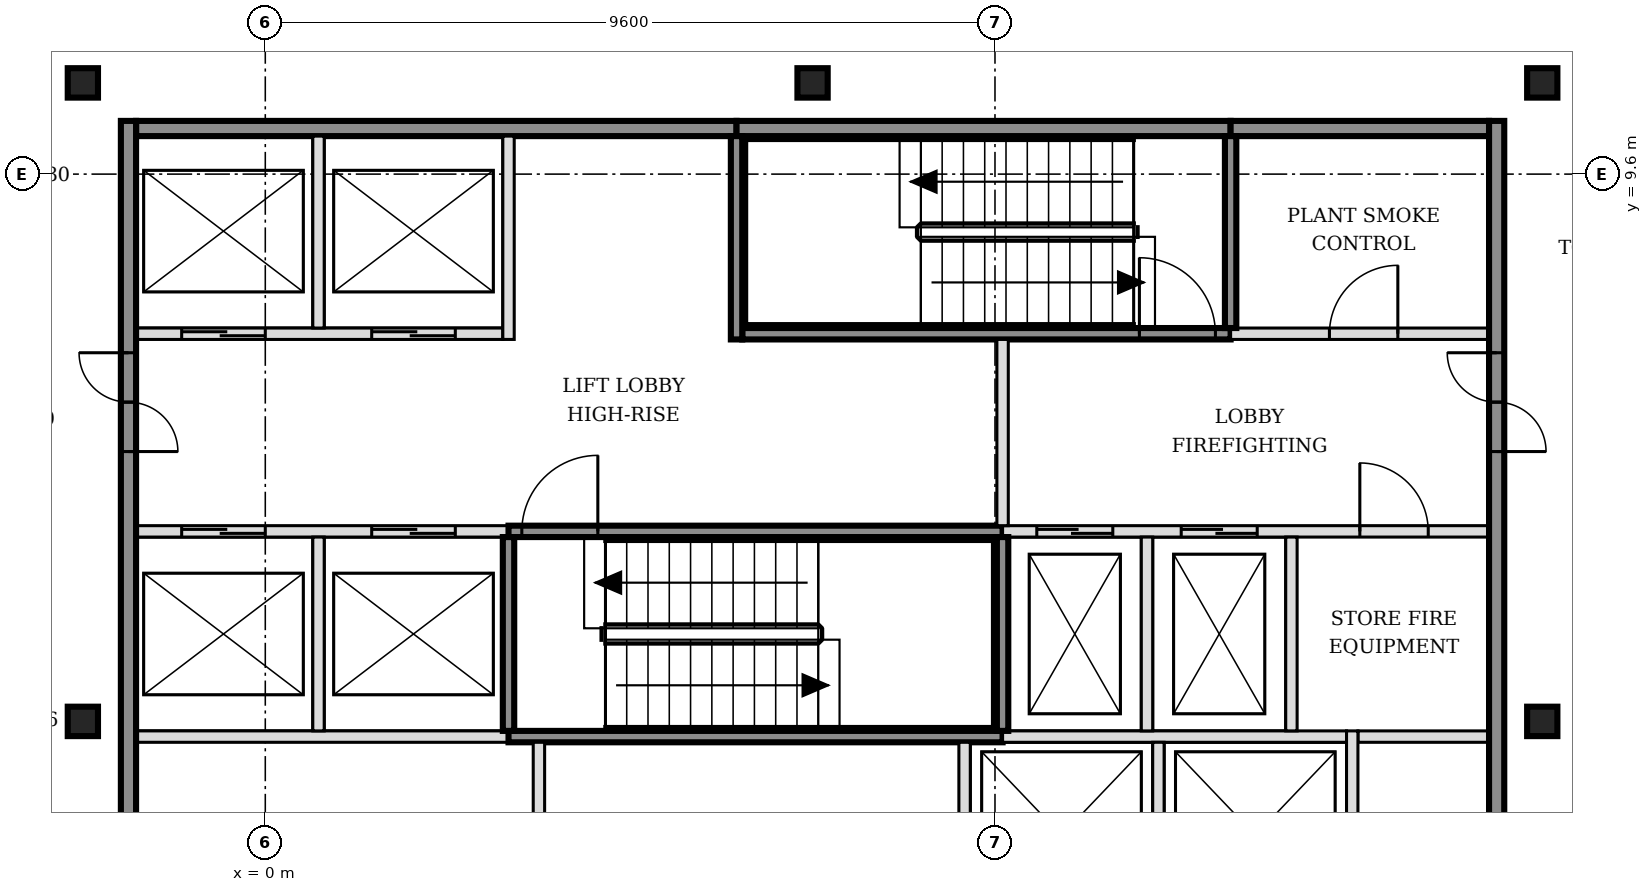
"""IFC4 building model, lengths in metres.
Left out: names, types, materials, properties, quantities, classifications, styles, units other than length and angle.
Written with IfcOpenShell. Run it as: python <this file> out.ifc"""

import sys

from ifc_helpers import new_model, si_unit, direction, frame, frame_2d, origin, origin_2d, place, context, subcontext, project, spatial, rectangle, i_section, extrude, element, fill, save


model = new_model("IFC4")
c1 = context("Model", 3, precision=1e-05, world=origin(), true_north=direction((0.0, 1.0)))
c2 = subcontext(c1, "Body", "Model", "MODEL_VIEW")
j1 = project(units=[si_unit("LENGTHUNIT", "METRE"), si_unit("PLANEANGLEUNIT", "RADIAN")], contexts=[c1])
p1 = place(None, origin())
s1 = spatial("IfcSite", under=j1, at=p1, CompositionType="ELEMENT")
p2 = place(p1, origin())
s2 = spatial("IfcBuilding", under=s1, at=p2, CompositionType="ELEMENT")
p3 = place(p2, frame((0.0, 0.0, 270.6)))
s3 = spatial("IfcBuildingStorey", under=s2, at=p3, CompositionType="ELEMENT", Elevation=270.6)
for number, where, z_axis, x_axis in (
    (1, (-2.4, 2.4, -0.15), (0.0, 0.0, 1.0), (1.0, 0.0, 0.0)),
    (2, (16.8, 2.4, -0.15), (0.0, 0.0, 1.0), (1.0, 0.0, 0.0)),
    (3, (-2.4, 10.8, -0.15), (0.0, 0.0, 1.0), (1.0, 0.0, 0.0)),
    (4, (7.2, 10.8, -0.15), (0.0, 0.0, 1.0), (1.0, 0.0, 0.0)),
    (5, (16.8, 10.8, -0.15), (0.0, 0.0, 1.0), (1.0, 0.0, 0.0)),
):
    element("IfcColumn", number, at=place(p3, frame(where, z_axis=z_axis, x_axis=x_axis)), inside=s3, PredefinedType="COLUMN", context=c2, shape_type="SweptSolid", body=[
        extrude(i_section(OverallWidth=0.398, OverallDepth=0.387, WebThickness=0.021, FlangeThickness=0.033, FilletRadius=0.015, at=origin_2d()), origin(), (0.0, 0.0, 1.0), 3.6),
    ])
p4 = place(p3, frame((-1.7, 2.2, 0.0), z_axis=(0.0, 0.0, 1.0), x_axis=(1.0, 0.0, 0.0)))
e6 = element("IfcWall", 6, at=p4, inside=s3, PredefinedType="SOLIDWALL", context=c2, shape_type="SweptSolid", body=[
    extrude(rectangle(XDim=4.9, YDim=0.15, at=frame_2d((2.45, 0.0))), origin(), (0.0, 0.0, 1.0), 3.45),
])
p5 = place(p3, frame((3.2, 2.2, 0.0), z_axis=(0.0, 0.0, 1.0), x_axis=(1.0, 0.0, 0.0)))
e7 = element("IfcWall", 7, at=p5, inside=s3, PredefinedType="SOLIDWALL", context=c2, shape_type="SweptSolid", body=[
    extrude(rectangle(XDim=6.5, YDim=0.15, at=frame_2d((3.25, 0.0))), origin(), (0.0, 0.0, 1.0), 3.45),
])
p6 = place(p3, frame((9.7, 2.2, 0.0), z_axis=(0.0, 0.0, 1.0), x_axis=(1.0, 0.0, 0.0)))
e8 = element("IfcWall", 8, at=p6, inside=s3, PredefinedType="SOLIDWALL", context=c2, shape_type="SweptSolid", body=[
    extrude(rectangle(XDim=4.525, YDim=0.15, at=frame_2d((2.263, 0.0))), origin(), (0.0, 0.0, 1.0), 3.45),
])
p7 = place(p3, frame((14.375, 2.2, 0.0), z_axis=(0.0, 0.0, 1.0), x_axis=(1.0, 0.0, 0.0)))
e9 = element("IfcWall", 9, at=p7, inside=s3, PredefinedType="PARTITIONING", context=c2, shape_type="SweptSolid", body=[
    extrude(rectangle(XDim=1.725, YDim=0.15, at=frame_2d((0.863, 0.0))), origin(), (0.0, 0.0, 1.0), 3.45),
])
p8 = place(p3, frame((-1.7, 4.9, 0.0), z_axis=(0.0, 0.0, 1.0), x_axis=(1.0, 0.0, 0.0)))
e10 = element("IfcWall", 10, at=p8, inside=s3, PredefinedType="SOLIDWALL", context=c2, shape_type="SweptSolid", body=[
    extrude(rectangle(XDim=4.9, YDim=0.15, at=frame_2d((2.45, 0.0))), origin(), (0.0, 0.0, 1.0), 3.45),
])
p9 = place(p8, frame((0.6, 0.0, 0.0)))
e11 = element("IfcOpeningElement", 11, at=p9, cuts=e10, PredefinedType="OPENING", context=c2, shape_type="SweptSolid", body=[
    extrude(rectangle(XDim=1.1, YDim=2.1, at=frame_2d((0.55, 1.05))), frame((0.0, 0.085, 0.0), z_axis=(0.0, -1.0, 0.0), x_axis=(1.0, 0.0, 0.0)), (0.0, 0.0, 1.0), 0.17),
])
p10 = place(p8, frame((3.1, 0.0, 0.0)))
e12 = element("IfcOpeningElement", 12, at=p10, cuts=e10, PredefinedType="OPENING", context=c2, shape_type="SweptSolid", body=[
    extrude(rectangle(XDim=1.1, YDim=2.1, at=frame_2d((0.55, 1.05))), frame((0.0, 0.085, 0.0), z_axis=(0.0, -1.0, 0.0), x_axis=(1.0, 0.0, 0.0)), (0.0, 0.0, 1.0), 0.17),
])
p11 = place(p3, frame((3.2, 4.9, 0.0), z_axis=(0.0, 0.0, 1.0), x_axis=(1.0, 0.0, 0.0)))
e13 = element("IfcWall", 13, at=p11, inside=s3, PredefinedType="SOLIDWALL", context=c2, shape_type="SweptSolid", body=[
    extrude(rectangle(XDim=6.5, YDim=0.15, at=frame_2d((3.25, 0.0))), origin(), (0.0, 0.0, 1.0), 3.45),
])
p12 = place(p11, frame((0.175, 0.0, 0.0)))
e14 = element("IfcOpeningElement", 14, at=p12, cuts=e13, PredefinedType="OPENING", context=c2, shape_type="SweptSolid", body=[
    extrude(rectangle(XDim=1.0, YDim=2.1, at=frame_2d((0.5, 1.05))), frame((0.0, 0.085, 0.0), z_axis=(0.0, -1.0, 0.0), x_axis=(1.0, 0.0, 0.0)), (0.0, 0.0, 1.0), 0.17),
])
p13 = place(p3, frame((9.7, 4.9, 0.0), z_axis=(0.0, 0.0, 1.0), x_axis=(1.0, 0.0, 0.0)))
e15 = element("IfcWall", 15, at=p13, inside=s3, PredefinedType="SOLIDWALL", context=c2, shape_type="SweptSolid", body=[
    extrude(rectangle(XDim=6.4, YDim=0.15, at=frame_2d((3.2, 0.0))), origin(), (0.0, 0.0, 1.0), 3.45),
])
p14 = place(p13, frame((0.45, 0.0, 0.0)))
e16 = element("IfcOpeningElement", 16, at=p14, cuts=e15, PredefinedType="OPENING", context=c2, shape_type="SweptSolid", body=[
    extrude(rectangle(XDim=1.0, YDim=2.1, at=frame_2d((0.5, 1.05))), frame((0.0, 0.085, 0.0), z_axis=(0.0, -1.0, 0.0), x_axis=(1.0, 0.0, 0.0)), (0.0, 0.0, 1.0), 0.17),
])
p15 = place(p13, frame((2.35, 0.0, 0.0)))
e17 = element("IfcOpeningElement", 17, at=p15, cuts=e15, PredefinedType="OPENING", context=c2, shape_type="SweptSolid", body=[
    extrude(rectangle(XDim=1.0, YDim=2.1, at=frame_2d((0.5, 1.05))), frame((0.0, 0.085, 0.0), z_axis=(0.0, -1.0, 0.0), x_axis=(1.0, 0.0, 0.0)), (0.0, 0.0, 1.0), 0.17),
])
p16 = place(p13, frame((4.7, 0.0, 0.0)))
e18 = element("IfcOpeningElement", 18, at=p16, cuts=e15, PredefinedType="OPENING", context=c2, shape_type="SweptSolid", body=[
    extrude(rectangle(XDim=0.9, YDim=2.1, at=frame_2d((0.45, 1.05))), frame((0.0, 0.085, 0.0), z_axis=(0.0, -1.0, 0.0), x_axis=(1.0, 0.0, 0.0)), (0.0, 0.0, 1.0), 0.17),
])
p17 = place(p3, frame((-1.7, 7.5, 0.0), z_axis=(0.0, 0.0, 1.0), x_axis=(1.0, 0.0, 0.0)))
e19 = element("IfcWall", 19, at=p17, inside=s3, PredefinedType="SOLIDWALL", context=c2, shape_type="SweptSolid", body=[
    extrude(rectangle(XDim=4.825, YDim=0.15, at=frame_2d((2.413, 0.0))), origin(), (0.0, 0.0, 1.0), 3.45),
])
p18 = place(p17, frame((0.6, 0.0, 0.0)))
e20 = element("IfcOpeningElement", 20, at=p18, cuts=e19, PredefinedType="OPENING", context=c2, shape_type="SweptSolid", body=[
    extrude(rectangle(XDim=1.1, YDim=2.1, at=frame_2d((0.55, 1.05))), frame((0.0, 0.085, 0.0), z_axis=(0.0, -1.0, 0.0), x_axis=(1.0, 0.0, 0.0)), (0.0, 0.0, 1.0), 0.17),
])
p19 = place(p17, frame((3.1, 0.0, 0.0)))
e21 = element("IfcOpeningElement", 21, at=p19, cuts=e19, PredefinedType="OPENING", context=c2, shape_type="SweptSolid", body=[
    extrude(rectangle(XDim=1.1, YDim=2.1, at=frame_2d((0.55, 1.05))), frame((0.0, 0.085, 0.0), z_axis=(0.0, -1.0, 0.0), x_axis=(1.0, 0.0, 0.0)), (0.0, 0.0, 1.0), 0.17),
])
p20 = place(p3, frame((6.275, 7.5, 0.0), z_axis=(0.0, 0.0, 1.0), x_axis=(1.0, 0.0, 0.0)))
e22 = element("IfcWall", 22, at=p20, inside=s3, PredefinedType="SOLIDWALL", context=c2, shape_type="SweptSolid", body=[
    extrude(rectangle(XDim=6.425, YDim=0.15, at=frame_2d((3.212, 0.0))), origin(), (0.0, 0.0, 1.0), 3.45),
])
p21 = place(p20, frame((5.225, 0.0, 0.0)))
e23 = element("IfcOpeningElement", 23, at=p21, cuts=e22, PredefinedType="OPENING", context=c2, shape_type="SweptSolid", body=[
    extrude(rectangle(XDim=1.0, YDim=2.1, at=frame_2d((0.5, 1.05))), frame((0.0, 0.085, 0.0), z_axis=(0.0, -1.0, 0.0), x_axis=(1.0, 0.0, 0.0)), (0.0, 0.0, 1.0), 0.17),
])
p22 = place(p3, frame((12.7, 7.5, 0.0), z_axis=(0.0, 0.0, 1.0), x_axis=(1.0, 0.0, 0.0)))
e24 = element("IfcWall", 24, at=p22, inside=s3, PredefinedType="SOLIDWALL", context=c2, shape_type="SweptSolid", body=[
    extrude(rectangle(XDim=3.4, YDim=0.15, at=frame_2d((1.7, 0.0))), origin(), (0.0, 0.0, 1.0), 3.45),
])
p23 = place(p22, frame((1.3, 0.0, 0.0)))
e25 = element("IfcOpeningElement", 25, at=p23, cuts=e24, PredefinedType="OPENING", context=c2, shape_type="SweptSolid", body=[
    extrude(rectangle(XDim=0.9, YDim=2.1, at=frame_2d((0.45, 1.05))), frame((0.0, 0.085, 0.0), z_axis=(0.0, -1.0, 0.0), x_axis=(1.0, 0.0, 0.0)), (0.0, 0.0, 1.0), 0.17),
])
p24 = place(p3, frame((-1.7, 10.2, 0.0), z_axis=(0.0, 0.0, 1.0), x_axis=(1.0, 0.0, 0.0)))
e26 = element("IfcWall", 26, at=p24, inside=s3, PredefinedType="SOLIDWALL", context=c2, shape_type="SweptSolid", body=[
    extrude(rectangle(XDim=7.9, YDim=0.2, at=frame_2d((3.95, 0.0))), origin(), (0.0, 0.0, 1.0), 3.45),
])
p25 = place(p3, frame((6.2, 10.2, 0.0), z_axis=(0.0, 0.0, 1.0), x_axis=(1.0, 0.0, 0.0)))
e27 = element("IfcWall", 27, at=p25, inside=s3, PredefinedType="SOLIDWALL", context=c2, shape_type="SweptSolid", body=[
    extrude(rectangle(XDim=6.5, YDim=0.2, at=frame_2d((3.25, 0.0))), origin(), (0.0, 0.0, 1.0), 3.45),
])
p26 = place(p3, frame((12.7, 10.2, 0.0), z_axis=(0.0, 0.0, 1.0), x_axis=(1.0, 0.0, 0.0)))
e28 = element("IfcWall", 28, at=p26, inside=s3, PredefinedType="SOLIDWALL", context=c2, shape_type="SweptSolid", body=[
    extrude(rectangle(XDim=3.4, YDim=0.2, at=frame_2d((1.7, 0.0))), origin(), (0.0, 0.0, 1.0), 3.45),
])
p27 = place(p3, frame((-1.8, -5.5, 0.0), z_axis=(0.0, 0.0, 1.0), x_axis=(0.0, 1.0, 0.0)))
e29 = element("IfcWall", 29, at=p27, inside=s3, PredefinedType="SOLIDWALL", context=c2, shape_type="SweptSolid", body=[
    extrude(rectangle(XDim=15.8, YDim=0.2, at=frame_2d((7.9, 0.0))), origin(), (0.0, 0.0, 1.0), 3.45),
])
p28 = place(p27, frame((3.05, 0.0, 0.0)))
e30 = element("IfcOpeningElement", 30, at=p28, cuts=e29, PredefinedType="OPENING", context=c2, shape_type="SweptSolid", body=[
    extrude(rectangle(XDim=1.3, YDim=2.1, at=frame_2d((0.65, 1.05))), frame((0.0, 0.11, 0.0), z_axis=(0.0, -1.0, 0.0), x_axis=(1.0, 0.0, 0.0)), (0.0, 0.0, 1.0), 0.22),
])
p29 = place(p27, frame((11.45, 0.0, 0.0)))
e31 = element("IfcOpeningElement", 31, at=p29, cuts=e29, PredefinedType="OPENING", context=c2, shape_type="SweptSolid", body=[
    extrude(rectangle(XDim=1.3, YDim=2.1, at=frame_2d((0.65, 1.05))), frame((0.0, 0.11, 0.0), z_axis=(0.0, -1.0, 0.0), x_axis=(1.0, 0.0, 0.0)), (0.0, 0.0, 1.0), 0.22),
])
p30 = place(p3, frame((0.7, 2.275, 0.0), z_axis=(0.0, 0.0, 1.0), x_axis=(0.0, 1.0, 0.0)))
e32 = element("IfcWall", 32, at=p30, inside=s3, PredefinedType="SOLIDWALL", context=c2, shape_type="SweptSolid", body=[
    extrude(rectangle(XDim=2.55, YDim=0.15, at=frame_2d((1.275, 0.0))), origin(), (0.0, 0.0, 1.0), 3.45),
])
p31 = place(p3, frame((0.7, 7.575, 0.0), z_axis=(0.0, 0.0, 1.0), x_axis=(0.0, 1.0, 0.0)))
e33 = element("IfcWall", 33, at=p31, inside=s3, PredefinedType="SOLIDWALL", context=c2, shape_type="SweptSolid", body=[
    extrude(rectangle(XDim=2.525, YDim=0.15, at=frame_2d((1.263, 0.0))), origin(), (0.0, 0.0, 1.0), 3.45),
])
p32 = place(p3, frame((3.2, 2.275, 0.0), z_axis=(0.0, 0.0, 1.0), x_axis=(0.0, 1.0, 0.0)))
e34 = element("IfcWall", 34, at=p32, inside=s3, PredefinedType="SOLIDWALL", context=c2, shape_type="SweptSolid", body=[
    extrude(rectangle(XDim=2.55, YDim=0.15, at=frame_2d((1.275, 0.0))), origin(), (0.0, 0.0, 1.0), 3.45),
])
p33 = place(p3, frame((3.2, 7.425, 0.0), z_axis=(0.0, 0.0, 1.0), x_axis=(0.0, 1.0, 0.0)))
e35 = element("IfcWall", 35, at=p33, inside=s3, PredefinedType="SOLIDWALL", context=c2, shape_type="SweptSolid", body=[
    extrude(rectangle(XDim=2.675, YDim=0.15, at=frame_2d((1.337, 0.0))), origin(), (0.0, 0.0, 1.0), 3.45),
])
p34 = place(p3, frame((3.6, -0.325, 0.0), z_axis=(0.0, 0.0, 1.0), x_axis=(0.0, 1.0, 0.0)))
e36 = element("IfcWall", 36, at=p34, inside=s3, PredefinedType="PARTITIONING", context=c2, shape_type="SweptSolid", body=[
    extrude(rectangle(XDim=2.45, YDim=0.15, at=frame_2d((1.225, 0.0))), origin(), (0.0, 0.0, 1.0), 3.45),
])
p35 = place(p3, frame((6.2, 7.425, 0.0), z_axis=(0.0, 0.0, 1.0), x_axis=(0.0, 1.0, 0.0)))
e37 = element("IfcWall", 37, at=p35, inside=s3, PredefinedType="SOLIDWALL", context=c2, shape_type="SweptSolid", body=[
    extrude(rectangle(XDim=2.675, YDim=0.15, at=frame_2d((1.337, 0.0))), origin(), (0.0, 0.0, 1.0), 3.45),
])
p36 = place(p3, frame((9.2, -0.475, 0.0), z_axis=(0.0, 0.0, 1.0), x_axis=(0.0, 1.0, 0.0)))
e38 = element("IfcWall", 38, at=p36, inside=s3, PredefinedType="SOLIDWALL", context=c2, shape_type="SweptSolid", body=[
    extrude(rectangle(XDim=2.6, YDim=0.15, at=frame_2d((1.3, 0.0))), origin(), (0.0, 0.0, 1.0), 3.45),
])
p37 = place(p3, frame((9.7, 2.275, 0.0), z_axis=(0.0, 0.0, 1.0), x_axis=(0.0, 1.0, 0.0)))
e39 = element("IfcWall", 39, at=p37, inside=s3, PredefinedType="SOLIDWALL", context=c2, shape_type="SweptSolid", body=[
    extrude(rectangle(XDim=2.55, YDim=0.15, at=frame_2d((1.275, 0.0))), origin(), (0.0, 0.0, 1.0), 3.45),
])
p38 = place(p3, frame((9.7, 4.975, 0.0), z_axis=(0.0, 0.0, 1.0), x_axis=(0.0, 1.0, 0.0)))
e40 = element("IfcWall", 40, at=p38, inside=s3, PredefinedType="SOLIDWALL", context=c2, shape_type="SweptSolid", body=[
    extrude(rectangle(XDim=2.45, YDim=0.15, at=frame_2d((1.225, 0.0))), origin(), (0.0, 0.0, 1.0), 3.45),
])
p39 = place(p3, frame((11.6, 2.275, 0.0), z_axis=(0.0, 0.0, 1.0), x_axis=(0.0, 1.0, 0.0)))
e41 = element("IfcWall", 41, at=p39, inside=s3, PredefinedType="SOLIDWALL", context=c2, shape_type="SweptSolid", body=[
    extrude(rectangle(XDim=2.55, YDim=0.15, at=frame_2d((1.275, 0.0))), origin(), (0.0, 0.0, 1.0), 3.45),
])
p40 = place(p3, frame((11.75, -0.325, 0.0), z_axis=(0.0, 0.0, 1.0), x_axis=(0.0, 1.0, 0.0)))
e42 = element("IfcWall", 42, at=p40, inside=s3, PredefinedType="SOLIDWALL", context=c2, shape_type="SweptSolid", body=[
    extrude(rectangle(XDim=2.45, YDim=0.15, at=frame_2d((1.225, 0.0))), origin(), (0.0, 0.0, 1.0), 3.45),
])
p41 = place(p3, frame((12.7, 7.575, 0.0), z_axis=(0.0, 0.0, 1.0), x_axis=(0.0, 1.0, 0.0)))
e43 = element("IfcWall", 43, at=p41, inside=s3, PredefinedType="SOLIDWALL", context=c2, shape_type="SweptSolid", body=[
    extrude(rectangle(XDim=2.525, YDim=0.15, at=frame_2d((1.263, 0.0))), origin(), (0.0, 0.0, 1.0), 3.45),
])
p42 = place(p3, frame((13.5, 2.275, 0.0), z_axis=(0.0, 0.0, 1.0), x_axis=(0.0, 1.0, 0.0)))
e44 = element("IfcWall", 44, at=p42, inside=s3, PredefinedType="SOLIDWALL", context=c2, shape_type="SweptSolid", body=[
    extrude(rectangle(XDim=2.55, YDim=0.15, at=frame_2d((1.275, 0.0))), origin(), (0.0, 0.0, 1.0), 3.45),
])
p43 = place(p3, frame((14.3, -0.475, 0.0), z_axis=(0.0, 0.0, 1.0), x_axis=(0.0, 1.0, 0.0)))
e45 = element("IfcWall", 45, at=p43, inside=s3, PredefinedType="SOLIDWALL", context=c2, shape_type="SweptSolid", body=[
    extrude(rectangle(XDim=2.75, YDim=0.15, at=frame_2d((1.375, 0.0))), origin(), (0.0, 0.0, 1.0), 3.45),
])
p44 = place(p3, frame((16.2, -5.5, 0.0), z_axis=(0.0, 0.0, 1.0), x_axis=(0.0, 1.0, 0.0)))
e46 = element("IfcWall", 46, at=p44, inside=s3, PredefinedType="SOLIDWALL", context=c2, shape_type="SweptSolid", body=[
    extrude(rectangle(XDim=15.8, YDim=0.2, at=frame_2d((7.9, 0.0))), origin(), (0.0, 0.0, 1.0), 3.45),
])
p45 = place(p44, frame((3.05, 0.0, 0.0)))
e47 = element("IfcOpeningElement", 47, at=p45, cuts=e46, PredefinedType="OPENING", context=c2, shape_type="SweptSolid", body=[
    extrude(rectangle(XDim=1.3, YDim=2.1, at=frame_2d((0.65, 1.05))), frame((0.0, 0.11, 0.0), z_axis=(0.0, -1.0, 0.0), x_axis=(1.0, 0.0, 0.0)), (0.0, 0.0, 1.0), 0.22),
])
p46 = place(p44, frame((11.45, 0.0, 0.0)))
e48 = element("IfcOpeningElement", 48, at=p46, cuts=e46, PredefinedType="OPENING", context=c2, shape_type="SweptSolid", body=[
    extrude(rectangle(XDim=1.3, YDim=2.1, at=frame_2d((0.65, 1.05))), frame((0.0, 0.11, 0.0), z_axis=(0.0, -1.0, 0.0), x_axis=(1.0, 0.0, 0.0)), (0.0, 0.0, 1.0), 0.22),
])
p47 = place(p9, origin())
e49 = element("IfcDoor", 49, at=p47, inside=s3, OperationType="DOUBLE_DOOR_SLIDING", PredefinedType="DOOR", context=c2, shape_type="SweptSolid", body=[
    extrude(rectangle(XDim=1.1, YDim=2.1, at=frame_2d((0.55, 1.05))), frame((0.0, 0.025, 0.0), z_axis=(0.0, -1.0, 0.0), x_axis=(1.0, 0.0, 0.0)), (0.0, 0.0, 1.0), 0.05),
])
fill(e11, e49)
p48 = place(p10, origin())
e50 = element("IfcDoor", 50, at=p48, inside=s3, OperationType="DOUBLE_DOOR_SLIDING", PredefinedType="DOOR", context=c2, shape_type="SweptSolid", body=[
    extrude(rectangle(XDim=1.1, YDim=2.1, at=frame_2d((0.55, 1.05))), frame((0.0, 0.025, 0.0), z_axis=(0.0, -1.0, 0.0), x_axis=(1.0, 0.0, 0.0)), (0.0, 0.0, 1.0), 0.05),
])
fill(e12, e50)
p49 = place(p18, origin())
e51 = element("IfcDoor", 51, at=p49, inside=s3, OperationType="DOUBLE_DOOR_SLIDING", PredefinedType="DOOR", context=c2, shape_type="SweptSolid", body=[
    extrude(rectangle(XDim=1.1, YDim=2.1, at=frame_2d((0.55, 1.05))), frame((0.0, 0.025, 0.0), z_axis=(0.0, -1.0, 0.0), x_axis=(1.0, 0.0, 0.0)), (0.0, 0.0, 1.0), 0.05),
])
fill(e20, e51)
p50 = place(p19, origin())
e52 = element("IfcDoor", 52, at=p50, inside=s3, OperationType="DOUBLE_DOOR_SLIDING", PredefinedType="DOOR", context=c2, shape_type="SweptSolid", body=[
    extrude(rectangle(XDim=1.1, YDim=2.1, at=frame_2d((0.55, 1.05))), frame((0.0, 0.025, 0.0), z_axis=(0.0, -1.0, 0.0), x_axis=(1.0, 0.0, 0.0)), (0.0, 0.0, 1.0), 0.05),
])
fill(e21, e52)
p51 = place(p14, origin())
e53 = element("IfcDoor", 53, at=p51, inside=s3, OperationType="DOUBLE_DOOR_SLIDING", PredefinedType="DOOR", context=c2, shape_type="SweptSolid", body=[
    extrude(rectangle(XDim=1.0, YDim=2.1, at=frame_2d((0.5, 1.05))), frame((0.0, 0.025, 0.0), z_axis=(0.0, -1.0, 0.0), x_axis=(1.0, 0.0, 0.0)), (0.0, 0.0, 1.0), 0.05),
])
fill(e16, e53)
p52 = place(p15, origin())
e54 = element("IfcDoor", 54, at=p52, inside=s3, OperationType="DOUBLE_DOOR_SLIDING", PredefinedType="DOOR", context=c2, shape_type="SweptSolid", body=[
    extrude(rectangle(XDim=1.0, YDim=2.1, at=frame_2d((0.5, 1.05))), frame((0.0, 0.025, 0.0), z_axis=(0.0, -1.0, 0.0), x_axis=(1.0, 0.0, 0.0)), (0.0, 0.0, 1.0), 0.05),
])
fill(e17, e54)
p53 = place(p12, origin())
e55 = element("IfcDoor", 55, at=p53, inside=s3, OperationType="SINGLE_SWING_RIGHT", PredefinedType="DOOR", context=c2, shape_type="SweptSolid", body=[
    extrude(rectangle(XDim=1.0, YDim=2.1, at=frame_2d((0.5, 1.05))), frame((0.0, 0.025, 0.0), z_axis=(0.0, -1.0, 0.0), x_axis=(1.0, 0.0, 0.0)), (0.0, 0.0, 1.0), 0.05),
])
fill(e14, e55)
p54 = place(p21, origin())
e56 = element("IfcDoor", 56, at=p54, inside=s3, OperationType="SINGLE_SWING_LEFT", PredefinedType="DOOR", context=c2, shape_type="SweptSolid", body=[
    extrude(rectangle(XDim=1.0, YDim=2.1, at=frame_2d((0.5, 1.05))), frame((0.0, 0.025, 0.0), z_axis=(0.0, -1.0, 0.0), x_axis=(1.0, 0.0, 0.0)), (0.0, 0.0, 1.0), 0.05),
])
fill(e23, e56)
p55 = place(p29, origin())
e57 = element("IfcDoor", 57, at=p55, inside=s3, OperationType="DOUBLE_DOOR_SINGLE_SWING", PredefinedType="DOOR", context=c2, shape_type="SweptSolid", body=[
    extrude(rectangle(XDim=1.3, YDim=2.1, at=frame_2d((0.65, 1.05))), frame((0.0, 0.025, 0.0), z_axis=(0.0, -1.0, 0.0), x_axis=(1.0, 0.0, 0.0)), (0.0, 0.0, 1.0), 0.05),
])
fill(e31, e57)
p56 = place(p46, origin())
e58 = element("IfcDoor", 58, at=p56, inside=s3, OperationType="DOUBLE_DOOR_SINGLE_SWING", PredefinedType="DOOR", context=c2, shape_type="SweptSolid", body=[
    extrude(rectangle(XDim=1.3, YDim=2.1, at=frame_2d((0.65, 1.05))), frame((0.0, 0.025, 0.0), z_axis=(0.0, -1.0, 0.0), x_axis=(1.0, 0.0, 0.0)), (0.0, 0.0, 1.0), 0.05),
])
fill(e48, e58)
p57 = place(p16, origin())
e59 = element("IfcDoor", 59, at=p57, inside=s3, OperationType="SINGLE_SWING_LEFT", PredefinedType="DOOR", context=c2, shape_type="SweptSolid", body=[
    extrude(rectangle(XDim=0.9, YDim=2.1, at=frame_2d((0.45, 1.05))), frame((0.0, 0.025, 0.0), z_axis=(0.0, -1.0, 0.0), x_axis=(1.0, 0.0, 0.0)), (0.0, 0.0, 1.0), 0.05),
])
fill(e18, e59)
p58 = place(p23, origin())
e60 = element("IfcDoor", 60, at=p58, inside=s3, OperationType="SINGLE_SWING_RIGHT", PredefinedType="DOOR", context=c2, shape_type="SweptSolid", body=[
    extrude(rectangle(XDim=0.9, YDim=2.1, at=frame_2d((0.45, 1.05))), frame((0.0, 0.025, 0.0), z_axis=(0.0, -1.0, 0.0), x_axis=(1.0, 0.0, 0.0)), (0.0, 0.0, 1.0), 0.05),
])
fill(e25, e60)
save(model, sys.argv[1])
